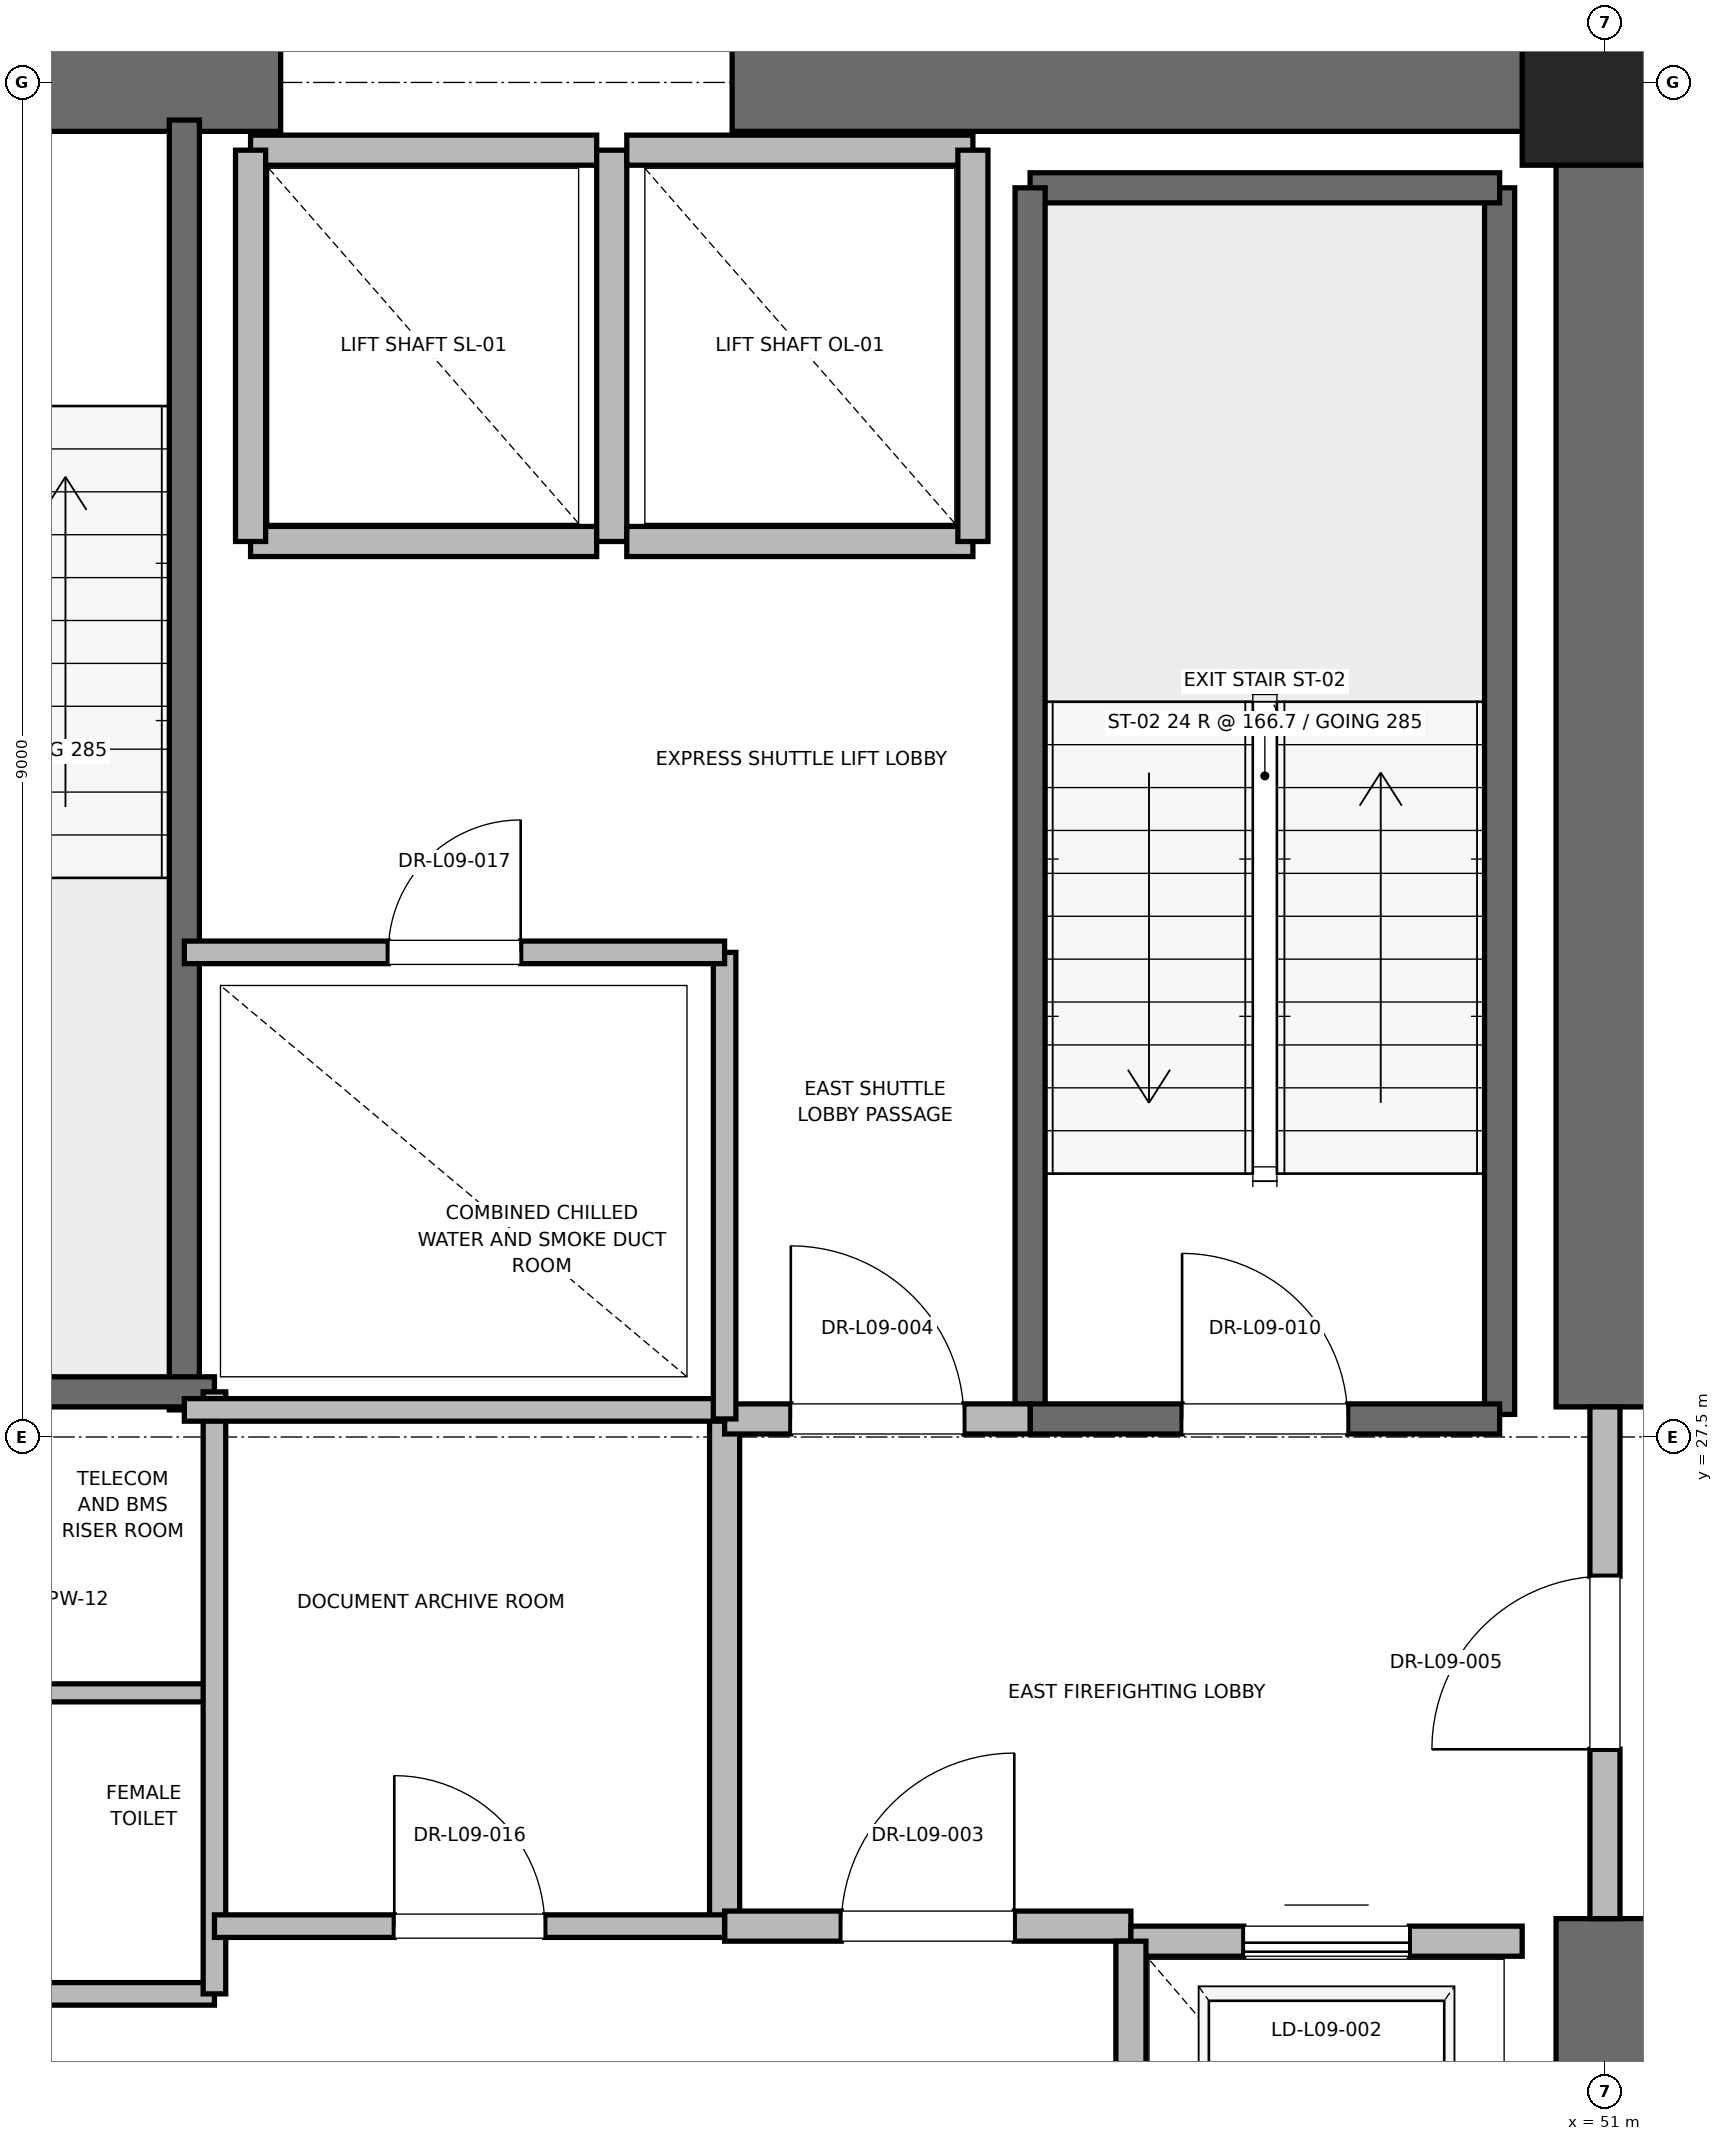
"""IFC4 building model, lengths in metres.
Left out: names, types, materials, properties, quantities, classifications, styles, units other than length and angle.
Written with IfcOpenShell. Run it as: python <this file> out.ifc"""

import sys

from ifc_helpers import new_model, si_unit, direction, frame, frame_2d, origin, origin_2d, place, context, subcontext, project, spatial, rectangle, extrude, element, fill, save


model = new_model("IFC4")
c1 = context("Model", 3, precision=1e-05, world=origin(), true_north=direction((0.0, 1.0)))
c2 = subcontext(c1, "Body", "Model", "MODEL_VIEW")
j1 = project(units=[si_unit("LENGTHUNIT", "METRE"), si_unit("PLANEANGLEUNIT", "RADIAN")], contexts=[c1])
p1 = place(None, origin())
s1 = spatial("IfcSite", under=j1, at=p1, CompositionType="ELEMENT")
p2 = place(p1, origin())
s2 = spatial("IfcBuilding", under=s1, at=p2, CompositionType="ELEMENT")
p3 = place(p2, frame((0.0, 0.0, 43.6)))
s3 = spatial("IfcBuildingStorey", under=s2, at=p3, CompositionType="ELEMENT", Elevation=43.6)
p4 = place(p3, frame((51.0, 36.5, 0.0), z_axis=(0.0, 0.0, 1.0), x_axis=(1.0, 0.0, 0.0)))
e1 = element("IfcColumn", 1, at=p4, inside=s3, PredefinedType="PILASTER", context=c2, shape_type="SweptSolid", body=[
    extrude(rectangle(XDim=1.1, YDim=1.1, at=origin_2d()), origin(), (0.0, 0.0, 1.0), 4.0),
])
p5 = place(p3, frame((37.8, 36.5, 0.0), z_axis=(0.0, 0.0, 1.0), x_axis=(1.0, 0.0, 0.0)))
e2 = element("IfcWall", 2, at=p5, inside=s3, PredefinedType="SHEAR", context=c2, shape_type="SweptSolid", body=[
    extrude(rectangle(XDim=4.4, YDim=0.65, at=frame_2d((2.2, 0.0))), origin(), (0.0, 0.0, 1.0), 3.76),
])
p6 = place(p5, frame((1.65, 0.0, 0.0)))
e3 = element("IfcOpeningElement", 3, at=p6, cuts=e2, PredefinedType="OPENING", context=c2, shape_type="SweptSolid", body=[
    extrude(rectangle(XDim=1.1, YDim=2.15, at=frame_2d((0.55, 1.075))), frame((0.0, 0.325, 0.0), z_axis=(0.0, -1.0, 0.0), x_axis=(1.0, 0.0, 0.0)), (0.0, 0.0, 1.0), 0.65),
])
for number, where, z_axis, x_axis in (
    (4, (45.2, 36.5, 0.0), (0.0, 0.0, 1.0), (1.0, 0.0, 0.0)),
    (5, (51.0, 18.5, 0.0), (0.0, 0.0, 1.0), (0.0, 1.0, 0.0)),
):
    element("IfcWall", number, at=place(p3, frame(where, z_axis=z_axis, x_axis=x_axis)), inside=s3, PredefinedType="SHEAR", context=c2, shape_type="SweptSolid", body=[
        extrude(rectangle(XDim=5.8, YDim=0.65, at=frame_2d((2.9, 0.0))), origin(), (0.0, 0.0, 1.0), 3.76),
    ])
p7 = place(p3, frame((51.0, 27.7, 0.0), z_axis=(0.0, 0.0, 1.0), x_axis=(0.0, 1.0, 0.0)))
e6 = element("IfcWall", 6, at=p7, inside=s3, PredefinedType="SHEAR", context=c2, shape_type="SweptSolid", body=[
    extrude(rectangle(XDim=8.8, YDim=0.65, at=frame_2d((4.4, 0.0))), origin(), (0.0, 0.0, 1.0), 3.76),
])
p8 = place(p3, frame((50.3, 27.65, 0.0), z_axis=(0.0, 0.0, 1.0), x_axis=(0.0, 1.0, 0.0)))
e7 = element("IfcWall", 7, at=p8, inside=s3, PredefinedType="SOLIDWALL", context=c2, shape_type="SweptSolid", body=[
    extrude(rectangle(XDim=8.15, YDim=0.2, at=frame_2d((4.075, 0.0))), origin(), (0.0, 0.0, 1.0), 3.76),
])
p9 = place(p3, frame((47.18, 35.8, 0.0), z_axis=(0.0, 0.0, 1.0), x_axis=(1.0, 0.0, 0.0)))
e8 = element("IfcWall", 8, at=p9, inside=s3, PredefinedType="SOLIDWALL", context=c2, shape_type="SweptSolid", body=[
    extrude(rectangle(XDim=3.12, YDim=0.2, at=frame_2d((1.56, 0.0))), origin(), (0.0, 0.0, 1.0), 3.76),
])
p10 = place(p3, frame((47.18, 27.62, 0.0), z_axis=(0.0, 0.0, 1.0), x_axis=(0.0, 1.0, 0.0)))
e9 = element("IfcWall", 9, at=p10, inside=s3, PredefinedType="SOLIDWALL", context=c2, shape_type="SweptSolid", body=[
    extrude(rectangle(XDim=8.18, YDim=0.2, at=frame_2d((4.09, 0.0))), origin(), (0.0, 0.0, 1.0), 3.76),
])
p11 = place(p3, frame((47.18, 27.62, 0.0), z_axis=(0.0, 0.0, 1.0), x_axis=(1.0, 0.0, 0.0)))
e10 = element("IfcWall", 10, at=p11, inside=s3, PredefinedType="SOLIDWALL", context=c2, shape_type="SweptSolid", body=[
    extrude(rectangle(XDim=3.12, YDim=0.2, at=frame_2d((1.56, 0.0))), origin(), (0.0, 0.0, 1.0), 3.76),
])
p12 = place(p11, frame((1.01, 0.0, 0.0)))
e11 = element("IfcOpeningElement", 11, at=p12, cuts=e10, PredefinedType="OPENING", context=c2, shape_type="SweptSolid", body=[
    extrude(rectangle(XDim=1.1, YDim=2.15, at=frame_2d((0.55, 1.075))), frame((0.0, 0.1, 0.0), z_axis=(0.0, -1.0, 0.0), x_axis=(1.0, 0.0, 0.0)), (0.0, 0.0, 1.0), 0.2),
])
p13 = place(p3, frame((41.56, 27.68, 0.0), z_axis=(0.0, 0.0, 1.0), x_axis=(0.0, 1.0, 0.0)))
e12 = element("IfcWall", 12, at=p13, inside=s3, PredefinedType="SOLIDWALL", context=c2, shape_type="SweptSolid", body=[
    extrude(rectangle(XDim=8.57, YDim=0.2, at=frame_2d((4.285, 0.0))), origin(), (0.0, 0.0, 1.0), 3.76),
])
p14 = place(p3, frame((38.44, 27.8, 0.0), z_axis=(0.0, 0.0, 1.0), x_axis=(1.0, 0.0, 0.0)))
e13 = element("IfcWall", 13, at=p14, inside=s3, PredefinedType="SOLIDWALL", context=c2, shape_type="SweptSolid", body=[
    extrude(rectangle(XDim=3.32, YDim=0.2, at=frame_2d((1.66, 0.0))), origin(), (0.0, 0.0, 1.0), 3.76),
])
p15 = place(p3, frame((45.15, 24.25, 0.0), z_axis=(0.0, 0.0, 1.0), x_axis=(0.0, 1.0, 0.0)))
e14 = element("IfcWall", 14, at=p15, inside=s3, PredefinedType="PARTITIONING", context=c2, shape_type="SweptSolid", body=[
    extrude(rectangle(XDim=3.37, YDim=0.2, at=frame_2d((1.685, 0.0))), origin(), (0.0, 0.0, 1.0), 3.76),
])
p16 = place(p3, frame((45.15, 24.25, 0.0), z_axis=(0.0, 0.0, 1.0), x_axis=(1.0, 0.0, 0.0)))
e15 = element("IfcWall", 15, at=p16, inside=s3, PredefinedType="PARTITIONING", context=c2, shape_type="SweptSolid", body=[
    extrude(rectangle(XDim=2.7, YDim=0.2, at=frame_2d((1.35, 0.0))), origin(), (0.0, 0.0, 1.0), 3.76),
])
p17 = place(p16, frame((0.775, 0.0, 0.0)))
e16 = element("IfcOpeningElement", 16, at=p17, cuts=e15, PredefinedType="OPENING", context=c2, shape_type="SweptSolid", body=[
    extrude(rectangle(XDim=1.15, YDim=2.2, at=frame_2d((0.575, 1.1))), frame((0.0, 0.1, 0.0), z_axis=(0.0, -1.0, 0.0), x_axis=(1.0, 0.0, 0.0)), (0.0, 0.0, 1.0), 0.2),
])
p18 = place(p3, frame((45.15, 27.62, 0.0), z_axis=(0.0, 0.0, 1.0), x_axis=(1.0, 0.0, 0.0)))
e17 = element("IfcWall", 17, at=p18, inside=s3, PredefinedType="PARTITIONING", context=c2, shape_type="SweptSolid", body=[
    extrude(rectangle(XDim=2.03, YDim=0.2, at=frame_2d((1.015, 0.0))), origin(), (0.0, 0.0, 1.0), 3.76),
])
p19 = place(p18, frame((0.44, 0.0, 0.0)))
e18 = element("IfcOpeningElement", 18, at=p19, cuts=e17, PredefinedType="OPENING", context=c2, shape_type="SweptSolid", body=[
    extrude(rectangle(XDim=1.15, YDim=2.2, at=frame_2d((0.575, 1.1))), frame((0.0, 0.1, 0.0), z_axis=(0.0, -1.0, 0.0), x_axis=(1.0, 0.0, 0.0)), (0.0, 0.0, 1.0), 0.2),
])
p20 = place(p3, frame((51.0, 24.3, 0.0), z_axis=(0.0, 0.0, 1.0), x_axis=(0.0, 1.0, 0.0)))
e19 = element("IfcWall", 19, at=p20, inside=s3, PredefinedType="PARTITIONING", context=c2, shape_type="SweptSolid", body=[
    extrude(rectangle(XDim=3.4, YDim=0.2, at=frame_2d((1.7, 0.0))), origin(), (0.0, 0.0, 1.0), 2.54),
])
p21 = place(p20, frame((1.125, 0.0, 0.0)))
e20 = element("IfcOpeningElement", 20, at=p21, cuts=e19, PredefinedType="OPENING", context=c2, shape_type="SweptSolid", body=[
    extrude(rectangle(XDim=1.15, YDim=2.2, at=frame_2d((0.575, 1.1))), frame((0.0, 0.1, 0.0), z_axis=(0.0, -1.0, 0.0), x_axis=(1.0, 0.0, 0.0)), (0.0, 0.0, 1.0), 0.2),
])
p22 = place(p3, frame((50.45, 24.15, 0.0), z_axis=(0.0, 0.0, 1.0), x_axis=(-1.0, 0.0, 0.0)))
e21 = element("IfcWall", 21, at=p22, inside=s3, PredefinedType="SOLIDWALL", context=c2, shape_type="SweptSolid", body=[
    extrude(rectangle(XDim=2.6, YDim=0.2, at=frame_2d((1.3, 0.0))), origin(), (0.0, 0.0, 1.0), 2.54),
])
p23 = place(p22, frame((0.75, 0.0, 0.0)))
e22 = element("IfcOpeningElement", 22, at=p23, cuts=e21, PredefinedType="OPENING", context=c2, shape_type="SweptSolid", body=[
    extrude(rectangle(XDim=1.1, YDim=2.2, at=frame_2d((0.55, 1.1))), frame((0.0, 0.1, 0.0), z_axis=(0.0, -1.0, 0.0), x_axis=(1.0, 0.0, 0.0)), (0.0, 0.0, 1.0), 0.2),
])
p24 = place(p3, frame((47.85, 24.15, 0.0), z_axis=(0.0, 0.0, 1.0), x_axis=(0.0, -1.0, 0.0)))
e23 = element("IfcWall", 23, at=p24, inside=s3, PredefinedType="SOLIDWALL", context=c2, shape_type="SweptSolid", body=[
    extrude(rectangle(XDim=3.0, YDim=0.2, at=frame_2d((1.5, 0.0))), origin(), (0.0, 0.0, 1.0), 3.76),
])
p25 = place(p3, frame((42.0, 33.45, 0.0), z_axis=(0.0, 0.0, 1.0), x_axis=(1.0, 0.0, 0.0)))
e24 = element("IfcWall", 24, at=p25, inside=s3, PredefinedType="SOLIDWALL", context=c2, shape_type="SweptSolid", body=[
    extrude(rectangle(XDim=2.3, YDim=0.2, at=frame_2d((1.15, 0.0))), origin(), (0.0, 0.0, 1.0), 3.76),
])
p26 = place(p3, frame((44.3, 36.05, 0.0), z_axis=(0.0, 0.0, 1.0), x_axis=(-1.0, 0.0, 0.0)))
e25 = element("IfcWall", 25, at=p26, inside=s3, PredefinedType="SOLIDWALL", context=c2, shape_type="SweptSolid", body=[
    extrude(rectangle(XDim=2.3, YDim=0.2, at=frame_2d((1.15, 0.0))), origin(), (0.0, 0.0, 1.0), 2.54),
])
for number, where, z_axis, x_axis in (
    (26, (42.0, 36.05, 0.0), (0.0, 0.0, 1.0), (0.0, -1.0, 0.0)),
    (27, (44.4, 33.45, 0.0), (0.0, 0.0, 1.0), (0.0, 1.0, 0.0)),
):
    element("IfcWall", number, at=place(p3, frame(where, z_axis=z_axis, x_axis=x_axis)), inside=s3, PredefinedType="SOLIDWALL", context=c2, shape_type="SweptSolid", body=[
        extrude(rectangle(XDim=2.6, YDim=0.2, at=frame_2d((1.3, 0.0))), origin(), (0.0, 0.0, 1.0), 2.54),
    ])
p27 = place(p3, frame((44.5, 33.45, 0.0), z_axis=(0.0, 0.0, 1.0), x_axis=(1.0, 0.0, 0.0)))
e28 = element("IfcWall", 28, at=p27, inside=s3, PredefinedType="SOLIDWALL", context=c2, shape_type="SweptSolid", body=[
    extrude(rectangle(XDim=2.3, YDim=0.2, at=frame_2d((1.15, 0.0))), origin(), (0.0, 0.0, 1.0), 3.76),
])
p28 = place(p3, frame((46.8, 36.05, 0.0), z_axis=(0.0, 0.0, 1.0), x_axis=(-1.0, 0.0, 0.0)))
e29 = element("IfcWall", 29, at=p28, inside=s3, PredefinedType="SOLIDWALL", context=c2, shape_type="SweptSolid", body=[
    extrude(rectangle(XDim=2.3, YDim=0.2, at=frame_2d((1.15, 0.0))), origin(), (0.0, 0.0, 1.0), 2.54),
])
p29 = place(p3, frame((46.8, 33.45, 0.0), z_axis=(0.0, 0.0, 1.0), x_axis=(0.0, 1.0, 0.0)))
e30 = element("IfcWall", 30, at=p29, inside=s3, PredefinedType="SOLIDWALL", context=c2, shape_type="SweptSolid", body=[
    extrude(rectangle(XDim=2.6, YDim=0.2, at=frame_2d((1.3, 0.0))), origin(), (0.0, 0.0, 1.0), 3.76),
])
p30 = place(p3, frame((39.95, 23.8, 0.0), z_axis=(0.0, 0.0, 1.0), x_axis=(1.0, 0.0, 0.0)))
e31 = element("IfcWall", 31, at=p30, inside=s3, PredefinedType="PARTITIONING", context=c2, shape_type="SweptSolid", body=[
    extrude(rectangle(XDim=1.81, YDim=0.15, at=frame_2d((0.905, 0.0))), origin(), (0.0, 0.0, 1.0), 2.85),
])
p31 = place(p3, frame((39.95, 25.8, 0.0), z_axis=(0.0, 0.0, 1.0), x_axis=(1.0, 0.0, 0.0)))
e32 = element("IfcWall", 32, at=p31, inside=s3, PredefinedType="PARTITIONING", context=c2, shape_type="SweptSolid", body=[
    extrude(rectangle(XDim=1.81, YDim=0.12, at=frame_2d((0.905, 0.0))), origin(), (0.0, 0.0, 1.0), 2.85),
])
p32 = place(p3, frame((41.76, 23.8, 0.0), z_axis=(0.0, 0.0, 1.0), x_axis=(0.0, 1.0, 0.0)))
e33 = element("IfcWall", 33, at=p32, inside=s3, PredefinedType="PARTITIONING", context=c2, shape_type="SweptSolid", body=[
    extrude(rectangle(XDim=4.0, YDim=0.15, at=frame_2d((2.0, 0.0))), origin(), (0.0, 0.0, 1.0), 2.85),
])
p33 = place(p3, frame((41.56, 27.68, 0.0), z_axis=(0.0, 0.0, 1.0), x_axis=(1.0, 0.0, 0.0)))
e34 = element("IfcWall", 34, at=p33, inside=s3, PredefinedType="PARTITIONING", context=c2, shape_type="SweptSolid", body=[
    extrude(rectangle(XDim=3.59, YDim=0.15, at=frame_2d((1.795, 0.0))), origin(), (0.0, 0.0, 1.0), 2.85),
])
p34 = place(p3, frame((41.76, 24.25, 0.0), z_axis=(0.0, 0.0, 1.0), x_axis=(1.0, 0.0, 0.0)))
e35 = element("IfcWall", 35, at=p34, inside=s3, PredefinedType="PARTITIONING", context=c2, shape_type="SweptSolid", body=[
    extrude(rectangle(XDim=3.39, YDim=0.15, at=frame_2d((1.695, 0.0))), origin(), (0.0, 0.0, 1.0), 2.85),
])
p35 = place(p34, frame((1.195, 0.0, 0.0)))
e36 = element("IfcOpeningElement", 36, at=p35, cuts=e35, PredefinedType="OPENING", context=c2, shape_type="SweptSolid", body=[
    extrude(rectangle(XDim=1.0, YDim=2.15, at=frame_2d((0.5, 1.075))), frame((0.0, 0.075, 0.0), z_axis=(0.0, -1.0, 0.0), x_axis=(1.0, 0.0, 0.0)), (0.0, 0.0, 1.0), 0.15),
])
p36 = place(p3, frame((45.15, 27.62, 0.0), z_axis=(0.0, 0.0, 1.0), x_axis=(0.0, 1.0, 0.0)))
e37 = element("IfcWall", 37, at=p36, inside=s3, PredefinedType="PARTITIONING", context=c2, shape_type="SweptSolid", body=[
    extrude(rectangle(XDim=3.1, YDim=0.15, at=frame_2d((1.55, 0.0))), origin(), (0.0, 0.0, 1.0), 2.85),
])
p37 = place(p3, frame((41.56, 30.72, 0.0), z_axis=(0.0, 0.0, 1.0), x_axis=(1.0, 0.0, 0.0)))
e38 = element("IfcWall", 38, at=p37, inside=s3, PredefinedType="PARTITIONING", context=c2, shape_type="SweptSolid", body=[
    extrude(rectangle(XDim=3.59, YDim=0.15, at=frame_2d((1.795, 0.0))), origin(), (0.0, 0.0, 1.0), 2.85),
])
p38 = place(p37, frame((1.355, 0.0, 0.0)))
e39 = element("IfcOpeningElement", 39, at=p38, cuts=e38, PredefinedType="OPENING", context=c2, shape_type="SweptSolid", body=[
    extrude(rectangle(XDim=0.88, YDim=2.1, at=frame_2d((0.44, 1.05))), frame((0.0, 0.075, 0.0), z_axis=(0.0, -1.0, 0.0), x_axis=(1.0, 0.0, 0.0)), (0.0, 0.0, 1.0), 0.15),
])
p39 = place(p12, origin())
e40 = element("IfcDoor", 40, at=p39, inside=s3, OperationType="SINGLE_SWING_LEFT", PredefinedType="DOOR", context=c2, shape_type="SweptSolid", body=[
    extrude(rectangle(XDim=1.1, YDim=2.15, at=frame_2d((0.55, 1.075))), frame((0.0, 0.025, 0.0), z_axis=(0.0, -1.0, 0.0), x_axis=(1.0, 0.0, 0.0)), (0.0, 0.0, 1.0), 0.05),
])
fill(e11, e40)
p40 = place(p17, origin())
e41 = element("IfcDoor", 41, at=p40, inside=s3, OperationType="SINGLE_SWING_RIGHT", PredefinedType="DOOR", context=c2, shape_type="SweptSolid", body=[
    extrude(rectangle(XDim=1.15, YDim=2.2, at=frame_2d((0.575, 1.1))), frame((0.0, 0.025, 0.0), z_axis=(0.0, -1.0, 0.0), x_axis=(1.0, 0.0, 0.0)), (0.0, 0.0, 1.0), 0.05),
])
fill(e16, e41)
p41 = place(p19, origin())
e42 = element("IfcDoor", 42, at=p41, inside=s3, OperationType="SINGLE_SWING_LEFT", PredefinedType="DOOR", context=c2, shape_type="SweptSolid", body=[
    extrude(rectangle(XDim=1.15, YDim=2.2, at=frame_2d((0.575, 1.1))), frame((0.0, 0.025, 0.0), z_axis=(0.0, -1.0, 0.0), x_axis=(1.0, 0.0, 0.0)), (0.0, 0.0, 1.0), 0.05),
])
fill(e18, e42)
p42 = place(p21, origin())
e43 = element("IfcDoor", 43, at=p42, inside=s3, OperationType="SINGLE_SWING_LEFT", PredefinedType="DOOR", context=c2, shape_type="SweptSolid", body=[
    extrude(rectangle(XDim=1.15, YDim=2.2, at=frame_2d((0.575, 1.1))), frame((0.0, 0.025, 0.0), z_axis=(0.0, -1.0, 0.0), x_axis=(1.0, 0.0, 0.0)), (0.0, 0.0, 1.0), 0.05),
])
fill(e20, e43)
p43 = place(p23, origin())
e44 = element("IfcDoor", 44, at=p43, inside=s3, OperationType="SLIDING_TO_RIGHT", PredefinedType="DOOR", context=c2, shape_type="SweptSolid", body=[
    extrude(rectangle(XDim=1.1, YDim=2.2, at=frame_2d((0.55, 1.1))), frame((0.0, 0.025, 0.0), z_axis=(0.0, -1.0, 0.0), x_axis=(1.0, 0.0, 0.0)), (0.0, 0.0, 1.0), 0.05),
])
fill(e22, e44)
p44 = place(p35, origin())
e45 = element("IfcDoor", 45, at=p44, inside=s3, OperationType="SINGLE_SWING_LEFT", PredefinedType="DOOR", context=c2, shape_type="SweptSolid", body=[
    extrude(rectangle(XDim=1.0, YDim=2.15, at=frame_2d((0.5, 1.075))), frame((0.0, 0.025, 0.0), z_axis=(0.0, -1.0, 0.0), x_axis=(1.0, 0.0, 0.0)), (0.0, 0.0, 1.0), 0.05),
])
fill(e36, e45)
p45 = place(p38, origin())
e46 = element("IfcDoor", 46, at=p45, inside=s3, OperationType="SINGLE_SWING_RIGHT", PredefinedType="DOOR", context=c2, shape_type="SweptSolid", body=[
    extrude(rectangle(XDim=0.88, YDim=2.1, at=frame_2d((0.44, 1.05))), frame((0.0, 0.025, 0.0), z_axis=(0.0, -1.0, 0.0), x_axis=(1.0, 0.0, 0.0)), (0.0, 0.0, 1.0), 0.05),
])
fill(e39, e46)
save(model, sys.argv[1])
